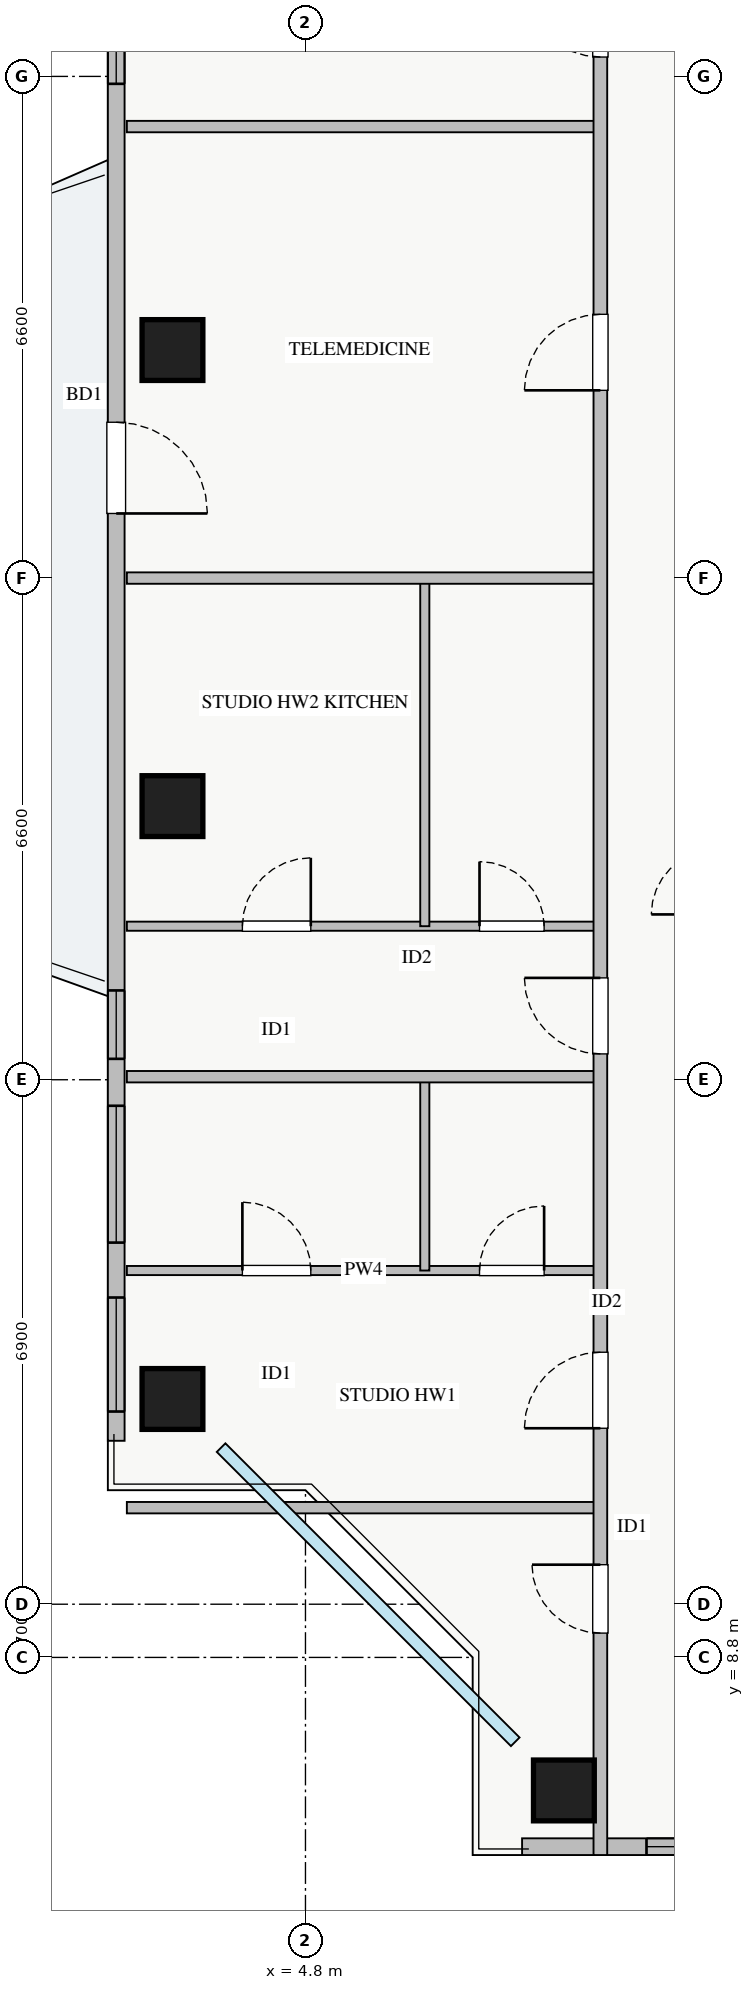
"""IFC4 building model, lengths in metres.
Left out: names, types, materials, properties, quantities, classifications, styles, units other than length and angle.
Written with IfcOpenShell. Run it as: python <this file> out.ifc"""

import sys

from ifc_helpers import new_model, si_unit, direction, frame, frame_2d, origin, origin_2d, place, context, subcontext, project, spatial, rectangle, extrude, source, transform, mapped, element, fill, save


model = new_model("IFC4")
c1 = context("Model", 3, precision=1e-05, world=origin(), true_north=direction((0.0, 1.0)))
c2 = subcontext(c1, "Body", "Model", "MODEL_VIEW")
j1 = project(units=[si_unit("LENGTHUNIT", "METRE"), si_unit("PLANEANGLEUNIT", "RADIAN")], contexts=[c1])
p1 = place(None, origin())
s1 = spatial("IfcSite", under=j1, at=p1, CompositionType="ELEMENT")
p2 = place(p1, origin())
s2 = spatial("IfcBuilding", under=s1, at=p2, CompositionType="ELEMENT")
p3 = place(p2, frame((0.0, 0.0, 210.0)))
s3 = spatial("IfcBuildingStorey", under=s2, at=p3, CompositionType="ELEMENT", Elevation=210.0)
m1 = source(origin(), c2, "Body", "SweptSolid", [
    extrude(rectangle(XDim=0.8, YDim=0.8, at=origin_2d()), origin(), (0.0, 0.0, 1.0), 3.25),
])
for number, where, z_axis, x_axis in (
    (1, (8.2, 7.05, 0.0), (0.0, 0.0, 1.0), (1.0, 0.0, 0.0)),
    (2, (3.05, 26.0, 0.0), (0.0, 0.0, 1.0), (1.0, 0.0, 0.0)),
    (3, (3.05, 20.0, 0.0), (0.0, 0.0, 1.0), (1.0, 0.0, 0.0)),
    (4, (3.05, 12.2, 0.0), (0.0, 0.0, 1.0), (1.0, 0.0, 0.0)),
):
    element("IfcColumn", number, at=place(p3, frame(where, z_axis=z_axis, x_axis=x_axis)), inside=s3, PredefinedType="COLUMN", context=c2, shape_type="MappedRepresentation", body=[
        mapped(m1, transform((0.0, 0.0, 0.0), x_axis=(1.0, 0.0, 0.0), y_axis=(0.0, 1.0, 0.0), z_axis=(0.0, 0.0, 1.0), scale=1.0)),
    ])
p4 = place(p3, frame((7.65, 6.31, 0.0), z_axis=(0.0, 0.0, 1.0), x_axis=(1.0, 0.0, 0.0)))
e5 = element("IfcWall", 5, at=p4, inside=s3, PredefinedType="STANDARD", context=c2, shape_type="SweptSolid", body=[
    extrude(rectangle(XDim=22.7, YDim=0.22, at=frame_2d((11.35, 0.0))), origin(), (0.0, 0.0, 1.0), 2.61),
])
p5 = place(p4, frame((12.2, 0.0, 0.0)))
e6 = element("IfcOpeningElement", 6, at=p5, cuts=e5, PredefinedType="OPENING", context=c2, shape_type="SweptSolid", body=[
    extrude(rectangle(XDim=1.2, YDim=2.1, at=frame_2d((0.6, 1.05))), frame((0.0, 0.12, 0.0), z_axis=(0.0, -1.0, 0.0), x_axis=(1.0, 0.0, 0.0)), (0.0, 0.0, 1.0), 0.24),
])
p6 = place(p4, frame((1.637, 0.0, 0.9)))
e7 = element("IfcOpeningElement", 7, at=p6, cuts=e5, PredefinedType="OPENING", context=c2, shape_type="SweptSolid", body=[
    extrude(rectangle(XDim=2.4, YDim=1.48, at=frame_2d((1.2, 0.74))), frame((0.0, 0.12, 0.0), z_axis=(0.0, -1.0, 0.0), x_axis=(1.0, 0.0, 0.0)), (0.0, 0.0, 1.0), 0.24),
])
p7 = place(p4, frame((7.612, 0.0, 0.9)))
e8 = element("IfcOpeningElement", 8, at=p7, cuts=e5, PredefinedType="OPENING", context=c2, shape_type="SweptSolid", body=[
    extrude(rectangle(XDim=1.8, YDim=1.45, at=frame_2d((0.9, 0.725))), frame((0.0, 0.12, 0.0), z_axis=(0.0, -1.0, 0.0), x_axis=(1.0, 0.0, 0.0)), (0.0, 0.0, 1.0), 0.24),
])
p8 = place(p4, frame((19.988, 0.0, 0.9)))
e9 = element("IfcOpeningElement", 9, at=p8, cuts=e5, PredefinedType="OPENING", context=c2, shape_type="SweptSolid", body=[
    extrude(rectangle(XDim=2.1, YDim=1.5, at=frame_2d((1.05, 0.75))), frame((0.0, 0.12, 0.0), z_axis=(0.0, -1.0, 0.0), x_axis=(1.0, 0.0, 0.0)), (0.0, 0.0, 1.0), 0.24),
])
p9 = place(p4, frame((16.27, 0.0, 0.9)))
e10 = element("IfcOpeningElement", 10, at=p9, cuts=e5, PredefinedType="OPENING", context=c2, shape_type="SweptSolid", body=[
    extrude(rectangle(XDim=2.4, YDim=1.5, at=frame_2d((1.2, 0.75))), frame((0.0, 0.12, 0.0), z_axis=(0.0, -1.0, 0.0), x_axis=(1.0, 0.0, 0.0)), (0.0, 0.0, 1.0), 0.24),
])
p10 = place(p3, frame((2.31, 11.65, 0.0), z_axis=(0.0, 0.0, 1.0), x_axis=(0.0, 1.0, 0.0)))
e11 = element("IfcWall", 11, at=p10, inside=s3, PredefinedType="STANDARD", context=c2, shape_type="SweptSolid", body=[
    extrude(rectangle(XDim=22.7, YDim=0.22, at=frame_2d((11.35, 0.0))), origin(), (0.0, 0.0, 1.0), 2.61),
])
p11 = place(p10, frame((12.2, 0.0, 0.0)))
e12 = element("IfcOpeningElement", 12, at=p11, cuts=e11, PredefinedType="OPENING", context=c2, shape_type="SweptSolid", body=[
    extrude(rectangle(XDim=1.2, YDim=2.1, at=frame_2d((0.6, 1.05))), frame((0.0, 0.12, 0.0), z_axis=(0.0, -1.0, 0.0), x_axis=(1.0, 0.0, 0.0)), (0.0, 0.0, 1.0), 0.24),
])
p12 = place(p10, frame((2.607, 0.0, 0.9)))
e13 = element("IfcOpeningElement", 13, at=p12, cuts=e11, PredefinedType="OPENING", context=c2, shape_type="SweptSolid", body=[
    extrude(rectangle(XDim=1.8, YDim=1.5, at=frame_2d((0.9, 0.75))), frame((0.0, 0.12, 0.0), z_axis=(0.0, -1.0, 0.0), x_axis=(1.0, 0.0, 0.0)), (0.0, 0.0, 1.0), 0.24),
])
p13 = place(p10, frame((17.853, 0.0, 0.9)))
e14 = element("IfcOpeningElement", 14, at=p13, cuts=e11, PredefinedType="OPENING", context=c2, shape_type="SweptSolid", body=[
    extrude(rectangle(XDim=2.1, YDim=1.5, at=frame_2d((1.05, 0.75))), frame((0.0, 0.12, 0.0), z_axis=(0.0, -1.0, 0.0), x_axis=(1.0, 0.0, 0.0)), (0.0, 0.0, 1.0), 0.24),
])
p14 = place(p10, frame((0.385, 0.0, 0.9)))
e15 = element("IfcOpeningElement", 15, at=p14, cuts=e11, PredefinedType="OPENING", context=c2, shape_type="SweptSolid", body=[
    extrude(rectangle(XDim=1.5, YDim=1.5, at=frame_2d((0.75, 0.75))), frame((0.0, 0.12, 0.0), z_axis=(0.0, -1.0, 0.0), x_axis=(1.0, 0.0, 0.0)), (0.0, 0.0, 1.0), 0.24),
])
p15 = place(p10, frame((20.835, 0.0, 0.9)))
e16 = element("IfcOpeningElement", 16, at=p15, cuts=e11, PredefinedType="OPENING", context=c2, shape_type="SweptSolid", body=[
    extrude(rectangle(XDim=1.5, YDim=1.5, at=frame_2d((0.75, 0.75))), frame((0.0, 0.12, 0.0), z_axis=(0.0, -1.0, 0.0), x_axis=(1.0, 0.0, 0.0)), (0.0, 0.0, 1.0), 0.24),
])
p16 = place(p10, frame((5.025, 0.0, 0.9)))
e17 = element("IfcOpeningElement", 17, at=p16, cuts=e11, PredefinedType="OPENING", context=c2, shape_type="SweptSolid", body=[
    extrude(rectangle(XDim=0.9, YDim=1.2, at=frame_2d((0.45, 0.6))), frame((0.0, 0.12, 0.0), z_axis=(0.0, -1.0, 0.0), x_axis=(1.0, 0.0, 0.0)), (0.0, 0.0, 1.0), 0.24),
])
p17 = place(p3, frame((2.45, 10.77, 0.0), z_axis=(0.0, 0.0, 1.0), x_axis=(1.0, 0.0, 0.0)))
e18 = element("IfcWall", 18, at=p17, inside=s3, PredefinedType="PARTITIONING", context=c2, shape_type="SweptSolid", body=[
    extrude(rectangle(XDim=6.23, YDim=0.15, at=frame_2d((3.115, 0.0))), origin(), (0.0, 0.0, 1.0), 3.07),
])
p18 = place(p3, frame((2.45, 13.89, 0.0), z_axis=(0.0, 0.0, 1.0), x_axis=(1.0, 0.0, 0.0)))
e19 = element("IfcWall", 19, at=p18, inside=s3, PredefinedType="PLUMBINGWALL", context=c2, shape_type="SweptSolid", body=[
    extrude(rectangle(XDim=6.23, YDim=0.12, at=frame_2d((3.115, 0.0))), origin(), (0.0, 0.0, 1.0), 3.07),
])
p19 = place(p18, frame((1.52, 0.0, 0.0)))
e20 = element("IfcOpeningElement", 20, at=p19, cuts=e19, PredefinedType="OPENING", context=c2, shape_type="SweptSolid", body=[
    extrude(rectangle(XDim=0.9, YDim=2.05, at=frame_2d((0.45, 1.025))), frame((0.0, 0.07, 0.0), z_axis=(0.0, -1.0, 0.0), x_axis=(1.0, 0.0, 0.0)), (0.0, 0.0, 1.0), 0.14),
])
p20 = place(p18, frame((4.64, 0.0, 0.0)))
e21 = element("IfcOpeningElement", 21, at=p20, cuts=e19, PredefinedType="OPENING", context=c2, shape_type="SweptSolid", body=[
    extrude(rectangle(XDim=0.85, YDim=2.05, at=frame_2d((0.425, 1.025))), frame((0.0, 0.07, 0.0), z_axis=(0.0, -1.0, 0.0), x_axis=(1.0, 0.0, 0.0)), (0.0, 0.0, 1.0), 0.14),
])
p21 = place(p3, frame((6.37, 13.89, 0.0), z_axis=(0.0, 0.0, 1.0), x_axis=(0.0, 1.0, 0.0)))
e22 = element("IfcWall", 22, at=p21, inside=s3, PredefinedType="PLUMBINGWALL", context=c2, shape_type="SweptSolid", body=[
    extrude(rectangle(XDim=2.55, YDim=0.12, at=frame_2d((1.275, 0.0))), origin(), (0.0, 0.0, 1.0), 3.07),
])
p22 = place(p3, frame((2.45, 18.42, 0.0), z_axis=(0.0, 0.0, 1.0), x_axis=(1.0, 0.0, 0.0)))
e23 = element("IfcWall", 23, at=p22, inside=s3, PredefinedType="PLUMBINGWALL", context=c2, shape_type="SweptSolid", body=[
    extrude(rectangle(XDim=6.23, YDim=0.12, at=frame_2d((3.115, 0.0))), origin(), (0.0, 0.0, 1.0), 3.07),
])
p23 = place(p22, frame((1.52, 0.0, 0.0)))
e24 = element("IfcOpeningElement", 24, at=p23, cuts=e23, PredefinedType="OPENING", context=c2, shape_type="SweptSolid", body=[
    extrude(rectangle(XDim=0.9, YDim=2.05, at=frame_2d((0.45, 1.025))), frame((0.0, 0.07, 0.0), z_axis=(0.0, -1.0, 0.0), x_axis=(1.0, 0.0, 0.0)), (0.0, 0.0, 1.0), 0.14),
])
p24 = place(p22, frame((4.64, 0.0, 0.0)))
e25 = element("IfcOpeningElement", 25, at=p24, cuts=e23, PredefinedType="OPENING", context=c2, shape_type="SweptSolid", body=[
    extrude(rectangle(XDim=0.85, YDim=2.05, at=frame_2d((0.425, 1.025))), frame((0.0, 0.07, 0.0), z_axis=(0.0, -1.0, 0.0), x_axis=(1.0, 0.0, 0.0)), (0.0, 0.0, 1.0), 0.14),
])
p25 = place(p3, frame((6.37, 18.42, 0.0), z_axis=(0.0, 0.0, 1.0), x_axis=(0.0, 1.0, 0.0)))
e26 = element("IfcWall", 26, at=p25, inside=s3, PredefinedType="PLUMBINGWALL", context=c2, shape_type="SweptSolid", body=[
    extrude(rectangle(XDim=4.58, YDim=0.12, at=frame_2d((2.29, 0.0))), origin(), (0.0, 0.0, 1.0), 3.07),
])
for number, where, z_axis, x_axis in (
    (27, (2.45, 16.44, 0.0), (0.0, 0.0, 1.0), (1.0, 0.0, 0.0)),
    (28, (2.45, 23.0, 0.0), (0.0, 0.0, 1.0), (1.0, 0.0, 0.0)),
    (29, (2.45, 28.94, 0.0), (0.0, 0.0, 1.0), (1.0, 0.0, 0.0)),
):
    element("IfcWall", number, at=place(p3, frame(where, z_axis=z_axis, x_axis=x_axis)), inside=s3, PredefinedType="PARTITIONING", context=c2, shape_type="SweptSolid", body=[
        extrude(rectangle(XDim=6.23, YDim=0.15, at=frame_2d((3.115, 0.0))), origin(), (0.0, 0.0, 1.0), 3.07),
    ])
p26 = place(p3, frame((8.68, 6.2, 0.0), z_axis=(0.0, 0.0, 1.0), x_axis=(0.0, 1.0, 0.0)))
e30 = element("IfcWall", 30, at=p26, inside=s3, PredefinedType="PARTITIONING", context=c2, shape_type="SweptSolid", body=[
    extrude(rectangle(XDim=33.6, YDim=0.18, at=frame_2d((16.8, 0.0))), origin(), (0.0, 0.0, 1.0), 3.07),
])
p27 = place(p26, frame((29.605, 0.0, 0.0)))
e31 = element("IfcOpeningElement", 31, at=p27, cuts=e30, PredefinedType="OPENING", context=c2, shape_type="SweptSolid", body=[
    extrude(rectangle(XDim=0.9, YDim=2.05, at=frame_2d((0.45, 1.025))), frame((0.0, 0.1, 0.0), z_axis=(0.0, -1.0, 0.0), x_axis=(1.0, 0.0, 0.0)), (0.0, 0.0, 1.0), 0.2),
])
p28 = place(p26, frame((2.92, 0.0, 0.0)))
e32 = element("IfcOpeningElement", 32, at=p28, cuts=e30, PredefinedType="OPENING", context=c2, shape_type="SweptSolid", body=[
    extrude(rectangle(XDim=0.9, YDim=2.05, at=frame_2d((0.45, 1.025))), frame((0.0, 0.1, 0.0), z_axis=(0.0, -1.0, 0.0), x_axis=(1.0, 0.0, 0.0)), (0.0, 0.0, 1.0), 0.2),
])
p29 = place(p26, frame((5.615, 0.0, 0.0)))
e33 = element("IfcOpeningElement", 33, at=p29, cuts=e30, PredefinedType="OPENING", context=c2, shape_type="SweptSolid", body=[
    extrude(rectangle(XDim=1.0, YDim=2.05, at=frame_2d((0.5, 1.025))), frame((0.0, 0.1, 0.0), z_axis=(0.0, -1.0, 0.0), x_axis=(1.0, 0.0, 0.0)), (0.0, 0.0, 1.0), 0.2),
])
p30 = place(p26, frame((10.54, 0.0, 0.0)))
e34 = element("IfcOpeningElement", 34, at=p30, cuts=e30, PredefinedType="OPENING", context=c2, shape_type="SweptSolid", body=[
    extrude(rectangle(XDim=1.0, YDim=2.05, at=frame_2d((0.5, 1.025))), frame((0.0, 0.1, 0.0), z_axis=(0.0, -1.0, 0.0), x_axis=(1.0, 0.0, 0.0)), (0.0, 0.0, 1.0), 0.2),
])
p31 = place(p26, frame((19.27, 0.0, 0.0)))
e35 = element("IfcOpeningElement", 35, at=p31, cuts=e30, PredefinedType="OPENING", context=c2, shape_type="SweptSolid", body=[
    extrude(rectangle(XDim=1.0, YDim=2.05, at=frame_2d((0.5, 1.025))), frame((0.0, 0.1, 0.0), z_axis=(0.0, -1.0, 0.0), x_axis=(1.0, 0.0, 0.0)), (0.0, 0.0, 1.0), 0.2),
])
p32 = place(p26, frame((23.655, 0.0, 0.0)))
e36 = element("IfcOpeningElement", 36, at=p32, cuts=e30, PredefinedType="OPENING", context=c2, shape_type="SweptSolid", body=[
    extrude(rectangle(XDim=1.0, YDim=2.05, at=frame_2d((0.5, 1.025))), frame((0.0, 0.1, 0.0), z_axis=(0.0, -1.0, 0.0), x_axis=(1.0, 0.0, 0.0)), (0.0, 0.0, 1.0), 0.2),
])
m2 = source(origin(), c2, "Body", "SweptSolid", [
    extrude(rectangle(XDim=2.4, YDim=1.48, at=frame_2d((1.2, 0.74))), frame((0.0, 0.03, 0.0), z_axis=(0.0, -1.0, 0.0), x_axis=(1.0, 0.0, 0.0)), (0.0, 0.0, 1.0), 0.06),
])
p33 = place(p6, origin())
e37 = element("IfcWindow", 37, at=p33, inside=s3, PartitioningType="TRIPLE_PANEL_VERTICAL", PredefinedType="WINDOW", context=c2, shape_type="MappedRepresentation", body=[
    mapped(m2, transform((0.0, 0.0, 0.0), x_axis=(1.0, 0.0, 0.0), y_axis=(0.0, 1.0, 0.0), z_axis=(0.0, 0.0, 1.0), scale=1.0)),
])
fill(e7, e37)
m3 = source(origin(), c2, "Body", "SweptSolid", [
    extrude(rectangle(XDim=1.2, YDim=2.1, at=frame_2d((0.6, 1.05))), frame((0.0, 0.025, 0.0), z_axis=(0.0, -1.0, 0.0), x_axis=(1.0, 0.0, 0.0)), (0.0, 0.0, 1.0), 0.05),
])
p34 = place(p11, frame((1.2, 0.0, 0.0), z_axis=(0.0, 0.0, 1.0), x_axis=(-1.0, 0.0, 0.0)))
e38 = element("IfcDoor", 38, at=p34, inside=s3, OperationType="SINGLE_SWING_LEFT", PredefinedType="DOOR", context=c2, shape_type="MappedRepresentation", body=[
    mapped(m3, transform((0.0, 0.0, 0.0), x_axis=(1.0, 0.0, 0.0), y_axis=(0.0, 1.0, 0.0), z_axis=(0.0, 0.0, 1.0), scale=1.0)),
])
fill(e12, e38)
m4 = source(origin(), c2, "Body", "SweptSolid", [
    extrude(rectangle(XDim=1.8, YDim=1.5, at=frame_2d((0.9, 0.75))), frame((0.0, 0.03, 0.0), z_axis=(0.0, -1.0, 0.0), x_axis=(1.0, 0.0, 0.0)), (0.0, 0.0, 1.0), 0.06),
])
p35 = place(p12, origin())
e39 = element("IfcWindow", 39, at=p35, inside=s3, PartitioningType="TRIPLE_PANEL_VERTICAL", PredefinedType="WINDOW", context=c2, shape_type="MappedRepresentation", body=[
    mapped(m4, transform((0.0, 0.0, 0.0), x_axis=(1.0, 0.0, 0.0), y_axis=(0.0, 1.0, 0.0), z_axis=(0.0, 0.0, 1.0), scale=1.0)),
])
fill(e13, e39)
m5 = source(origin(), c2, "Body", "SweptSolid", [
    extrude(rectangle(XDim=2.1, YDim=1.5, at=frame_2d((1.05, 0.75))), frame((0.0, 0.03, 0.0), z_axis=(0.0, -1.0, 0.0), x_axis=(1.0, 0.0, 0.0)), (0.0, 0.0, 1.0), 0.06),
])
p36 = place(p13, origin())
e40 = element("IfcWindow", 40, at=p36, inside=s3, PartitioningType="TRIPLE_PANEL_VERTICAL", PredefinedType="WINDOW", context=c2, shape_type="MappedRepresentation", body=[
    mapped(m5, transform((0.0, 0.0, 0.0), x_axis=(1.0, 0.0, 0.0), y_axis=(0.0, 1.0, 0.0), z_axis=(0.0, 0.0, 1.0), scale=1.0)),
])
fill(e14, e40)
m6 = source(origin(), c2, "Body", "SweptSolid", [
    extrude(rectangle(XDim=0.9, YDim=2.05, at=frame_2d((0.45, 1.025))), frame((0.0, 0.025, 0.0), z_axis=(0.0, -1.0, 0.0), x_axis=(1.0, 0.0, 0.0)), (0.0, 0.0, 1.0), 0.05),
])
p37 = place(p19, origin())
e41 = element("IfcDoor", 41, at=p37, inside=s3, OperationType="SINGLE_SWING_LEFT", PredefinedType="DOOR", context=c2, shape_type="MappedRepresentation", body=[
    mapped(m6, transform((0.0, 0.0, 0.0), x_axis=(1.0, 0.0, 0.0), y_axis=(0.0, 1.0, 0.0), z_axis=(0.0, 0.0, 1.0), scale=1.0)),
])
fill(e20, e41)
m7 = source(origin(), c2, "Body", "SweptSolid", [
    extrude(rectangle(XDim=0.85, YDim=2.05, at=frame_2d((0.425, 1.025))), frame((0.0, 0.025, 0.0), z_axis=(0.0, -1.0, 0.0), x_axis=(1.0, 0.0, 0.0)), (0.0, 0.0, 1.0), 0.05),
])
p38 = place(p20, origin())
e42 = element("IfcDoor", 42, at=p38, inside=s3, OperationType="SINGLE_SWING_RIGHT", PredefinedType="DOOR", context=c2, shape_type="MappedRepresentation", body=[
    mapped(m7, transform((0.0, 0.0, 0.0), x_axis=(1.0, 0.0, 0.0), y_axis=(0.0, 1.0, 0.0), z_axis=(0.0, 0.0, 1.0), scale=1.0)),
])
fill(e21, e42)
p39 = place(p23, origin())
e43 = element("IfcDoor", 43, at=p39, inside=s3, OperationType="SINGLE_SWING_RIGHT", PredefinedType="DOOR", context=c2, shape_type="MappedRepresentation", body=[
    mapped(m6, transform((0.0, 0.0, 0.0), x_axis=(1.0, 0.0, 0.0), y_axis=(0.0, 1.0, 0.0), z_axis=(0.0, 0.0, 1.0), scale=1.0)),
])
fill(e24, e43)
p40 = place(p24, origin())
e44 = element("IfcDoor", 44, at=p40, inside=s3, OperationType="SINGLE_SWING_LEFT", PredefinedType="DOOR", context=c2, shape_type="MappedRepresentation", body=[
    mapped(m7, transform((0.0, 0.0, 0.0), x_axis=(1.0, 0.0, 0.0), y_axis=(0.0, 1.0, 0.0), z_axis=(0.0, 0.0, 1.0), scale=1.0)),
])
fill(e25, e44)
p41 = place(p28, origin())
e45 = element("IfcDoor", 45, at=p41, inside=s3, OperationType="SINGLE_SWING_RIGHT", PredefinedType="DOOR", context=c2, shape_type="MappedRepresentation", body=[
    mapped(m6, transform((0.0, 0.0, 0.0), x_axis=(1.0, 0.0, 0.0), y_axis=(0.0, 1.0, 0.0), z_axis=(0.0, 0.0, 1.0), scale=1.0)),
])
fill(e32, e45)
m8 = source(origin(), c2, "Body", "SweptSolid", [
    extrude(rectangle(XDim=1.0, YDim=2.05, at=frame_2d((0.5, 1.025))), frame((0.0, 0.025, 0.0), z_axis=(0.0, -1.0, 0.0), x_axis=(1.0, 0.0, 0.0)), (0.0, 0.0, 1.0), 0.05),
])
p42 = place(p29, origin())
e46 = element("IfcDoor", 46, at=p42, inside=s3, OperationType="SINGLE_SWING_LEFT", PredefinedType="DOOR", context=c2, shape_type="MappedRepresentation", body=[
    mapped(m8, transform((0.0, 0.0, 0.0), x_axis=(1.0, 0.0, 0.0), y_axis=(0.0, 1.0, 0.0), z_axis=(0.0, 0.0, 1.0), scale=1.0)),
])
fill(e33, e46)
p43 = place(p30, origin())
e47 = element("IfcDoor", 47, at=p43, inside=s3, OperationType="SINGLE_SWING_RIGHT", PredefinedType="DOOR", context=c2, shape_type="MappedRepresentation", body=[
    mapped(m8, transform((0.0, 0.0, 0.0), x_axis=(1.0, 0.0, 0.0), y_axis=(0.0, 1.0, 0.0), z_axis=(0.0, 0.0, 1.0), scale=1.0)),
])
fill(e34, e47)
p44 = place(p31, origin())
e48 = element("IfcDoor", 48, at=p44, inside=s3, OperationType="SINGLE_SWING_LEFT", PredefinedType="DOOR", context=c2, shape_type="MappedRepresentation", body=[
    mapped(m8, transform((0.0, 0.0, 0.0), x_axis=(1.0, 0.0, 0.0), y_axis=(0.0, 1.0, 0.0), z_axis=(0.0, 0.0, 1.0), scale=1.0)),
])
fill(e35, e48)
p45 = place(p32, origin())
e49 = element("IfcDoor", 49, at=p45, inside=s3, OperationType="SINGLE_SWING_RIGHT", PredefinedType="DOOR", context=c2, shape_type="MappedRepresentation", body=[
    mapped(m8, transform((0.0, 0.0, 0.0), x_axis=(1.0, 0.0, 0.0), y_axis=(0.0, 1.0, 0.0), z_axis=(0.0, 0.0, 1.0), scale=1.0)),
])
fill(e36, e49)
m9 = source(origin(), c2, "Body", "SweptSolid", [
    extrude(rectangle(XDim=1.5, YDim=1.5, at=frame_2d((0.75, 0.75))), frame((0.0, 0.03, 0.0), z_axis=(0.0, -1.0, 0.0), x_axis=(1.0, 0.0, 0.0)), (0.0, 0.0, 1.0), 0.06),
])
p46 = place(p14, origin())
e50 = element("IfcWindow", 50, at=p46, inside=s3, PartitioningType="DOUBLE_PANEL_VERTICAL", PredefinedType="WINDOW", context=c2, shape_type="MappedRepresentation", body=[
    mapped(m9, transform((0.0, 0.0, 0.0), x_axis=(1.0, 0.0, 0.0), y_axis=(0.0, 1.0, 0.0), z_axis=(0.0, 0.0, 1.0), scale=1.0)),
])
fill(e15, e50)
m10 = source(origin(), c2, "Body", "SweptSolid", [
    extrude(rectangle(XDim=0.9, YDim=1.2, at=frame_2d((0.45, 0.6))), frame((0.0, 0.03, 0.0), z_axis=(0.0, -1.0, 0.0), x_axis=(1.0, 0.0, 0.0)), (0.0, 0.0, 1.0), 0.06),
])
p47 = place(p16, origin())
e51 = element("IfcWindow", 51, at=p47, inside=s3, PartitioningType="SINGLE_PANEL", PredefinedType="WINDOW", context=c2, shape_type="MappedRepresentation", body=[
    mapped(m10, transform((0.0, 0.0, 0.0), x_axis=(1.0, 0.0, 0.0), y_axis=(0.0, 1.0, 0.0), z_axis=(0.0, 0.0, 1.0), scale=1.0)),
])
fill(e17, e51)
save(model, sys.argv[1])
